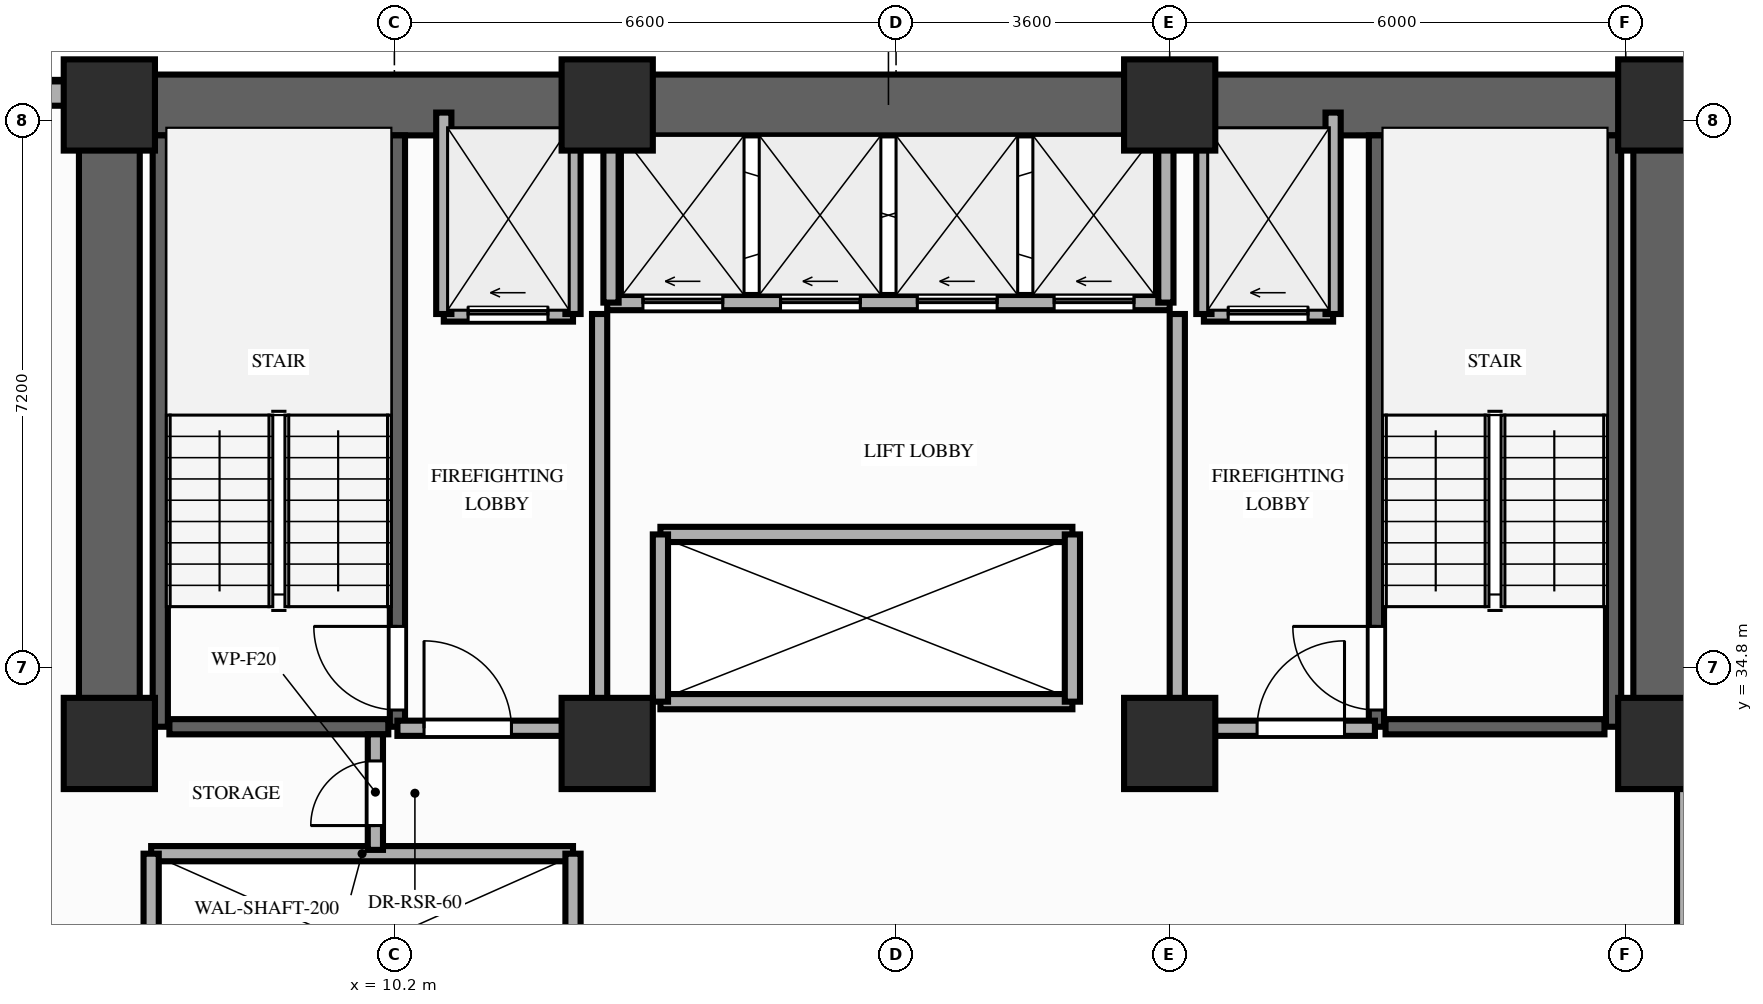
"""IFC4 building model, lengths in metres.
Left out: names, types, materials, properties, quantities, classifications, styles, units other than length and angle.
Written with IfcOpenShell. Run it as: python <this file> out.ifc"""

import sys

from ifc_helpers import new_model, si_unit, direction, frame, frame_2d, origin, origin_2d, place, context, subcontext, project, spatial, rectangle, extrude, element, fill, save


model = new_model("IFC4")
c1 = context("Model", 3, precision=1e-05, world=origin(), true_north=direction((0.0, 1.0)))
c2 = subcontext(c1, "Body", "Model", "MODEL_VIEW")
j1 = project(units=[si_unit("LENGTHUNIT", "METRE"), si_unit("PLANEANGLEUNIT", "RADIAN")], contexts=[c1])
p1 = place(None, origin())
s1 = spatial("IfcSite", under=j1, at=p1, CompositionType="ELEMENT")
p2 = place(p1, origin())
s2 = spatial("IfcBuilding", under=s1, at=p2, CompositionType="ELEMENT")
p3 = place(p2, frame((0.0, 0.0, 46.8)))
s3 = spatial("IfcBuildingStorey", under=s2, at=p3, CompositionType="ELEMENT", Elevation=46.8)
for number, where, z_axis, x_axis in (
    (1, (6.45, 33.8, 0.0), (0.0, 0.0, 1.0), (1.0, 0.0, 0.0)),
    (2, (13.0, 33.8, 0.0), (0.0, 0.0, 1.0), (1.0, 0.0, 0.0)),
    (3, (20.4, 33.8, 0.0), (0.0, 0.0, 1.0), (1.0, 0.0, 0.0)),
    (4, (26.9, 33.8, 0.0), (0.0, 0.0, 1.0), (1.0, 0.0, 0.0)),
    (5, (6.45, 42.2, 0.0), (0.0, 0.0, 1.0), (1.0, 0.0, 0.0)),
    (6, (13.0, 42.2, 0.0), (0.0, 0.0, 1.0), (1.0, 0.0, 0.0)),
    (7, (20.4, 42.2, 0.0), (0.0, 0.0, 1.0), (1.0, 0.0, 0.0)),
    (8, (26.9, 42.2, 0.0), (0.0, 0.0, 1.0), (1.0, 0.0, 0.0)),
):
    element("IfcColumn", number, at=place(p3, frame(where, z_axis=z_axis, x_axis=x_axis)), inside=s3, PredefinedType="COLUMN", context=c2, shape_type="SweptSolid", body=[
        extrude(rectangle(XDim=1.2, YDim=1.2, at=origin_2d()), origin(), (0.0, 0.0, 1.0), 3.2),
    ])
p4 = place(p3, frame((6.0, 42.35, 0.0), z_axis=(0.0, 0.0, 1.0), x_axis=(-1.0, 0.0, 0.0)))
e9 = element("IfcWall", 9, at=p4, inside=s3, PredefinedType="STANDARD", context=c2, shape_type="SweptSolid", body=[
    extrude(rectangle(XDim=2.0, YDim=0.32, at=frame_2d((1.0, 0.0))), origin(), (0.0, 0.0, 1.0), 3.02),
])
p5 = place(p3, frame((6.45, 42.2, 0.0), z_axis=(0.0, 0.0, 1.0), x_axis=(1.0, 0.0, 0.0)))
e10 = element("IfcWall", 10, at=p5, inside=s3, PredefinedType="SHEAR", context=c2, shape_type="SweptSolid", body=[
    extrude(rectangle(XDim=20.45, YDim=0.8, at=frame_2d((10.225, 0.0))), origin(), (0.0, 0.0, 1.0), 3.02),
])
for number, where, z_axis, x_axis in (
    (11, (6.45, 33.8, 0.0), (0.0, 0.0, 1.0), (0.0, 1.0, 0.0)),
    (12, (26.9, 33.8, 0.0), (0.0, 0.0, 1.0), (0.0, 1.0, 0.0)),
):
    element("IfcWall", number, at=place(p3, frame(where, z_axis=z_axis, x_axis=x_axis)), inside=s3, PredefinedType="SHEAR", context=c2, shape_type="SweptSolid", body=[
        extrude(rectangle(XDim=7.95, YDim=0.8, at=frame_2d((3.975, 0.0))), origin(), (0.0, 0.0, 1.0), 3.02),
    ])
p6 = place(p3, frame((7.12, 34.02, 0.0), z_axis=(0.0, 0.0, 1.0), x_axis=(0.0, 1.0, 0.0)))
e13 = element("IfcWall", 13, at=p6, inside=s3, PredefinedType="SHEAR", context=c2, shape_type="SweptSolid", body=[
    extrude(rectangle(XDim=7.78, YDim=0.2, at=frame_2d((3.89, 0.0))), origin(), (0.0, 0.0, 1.0), 3.02),
])
p7 = place(p3, frame((10.24, 34.02, 0.0), z_axis=(0.0, 0.0, 1.0), x_axis=(0.0, 1.0, 0.0)))
e14 = element("IfcWall", 14, at=p7, inside=s3, PredefinedType="SHEAR", context=c2, shape_type="SweptSolid", body=[
    extrude(rectangle(XDim=7.78, YDim=0.2, at=frame_2d((3.89, 0.0))), origin(), (0.0, 0.0, 1.0), 3.02),
])
p8 = place(p7, frame((0.22, 0.0, 0.0)))
e15 = element("IfcOpeningElement", 15, at=p8, cuts=e14, PredefinedType="OPENING", context=c2, shape_type="SweptSolid", body=[
    extrude(rectangle(XDim=1.1, YDim=2.15, at=frame_2d((0.55, 1.075))), frame((0.0, 0.11, 0.0), z_axis=(0.0, -1.0, 0.0), x_axis=(1.0, 0.0, 0.0)), (0.0, 0.0, 1.0), 0.22),
])
p9 = place(p3, frame((7.24, 34.02, 0.0), z_axis=(0.0, 0.0, 1.0), x_axis=(1.0, 0.0, 0.0)))
e16 = element("IfcWall", 16, at=p9, inside=s3, PredefinedType="SHEAR", context=c2, shape_type="SweptSolid", body=[
    extrude(rectangle(XDim=2.88, YDim=0.2, at=frame_2d((1.44, 0.0))), origin(), (0.0, 0.0, 1.0), 3.02),
])
p10 = place(p3, frame((23.12, 34.02, 0.0), z_axis=(0.0, 0.0, 1.0), x_axis=(0.0, 1.0, 0.0)))
e17 = element("IfcWall", 17, at=p10, inside=s3, PredefinedType="SHEAR", context=c2, shape_type="SweptSolid", body=[
    extrude(rectangle(XDim=7.78, YDim=0.2, at=frame_2d((3.89, 0.0))), origin(), (0.0, 0.0, 1.0), 3.02),
])
p11 = place(p10, frame((0.22, 0.0, 0.0)))
e18 = element("IfcOpeningElement", 18, at=p11, cuts=e17, PredefinedType="OPENING", context=c2, shape_type="SweptSolid", body=[
    extrude(rectangle(XDim=1.1, YDim=2.15, at=frame_2d((0.55, 1.075))), frame((0.0, 0.11, 0.0), z_axis=(0.0, -1.0, 0.0), x_axis=(1.0, 0.0, 0.0)), (0.0, 0.0, 1.0), 0.22),
])
p12 = place(p3, frame((26.24, 34.02, 0.0), z_axis=(0.0, 0.0, 1.0), x_axis=(0.0, 1.0, 0.0)))
e19 = element("IfcWall", 19, at=p12, inside=s3, PredefinedType="SHEAR", context=c2, shape_type="SweptSolid", body=[
    extrude(rectangle(XDim=7.78, YDim=0.2, at=frame_2d((3.89, 0.0))), origin(), (0.0, 0.0, 1.0), 3.02),
])
p13 = place(p3, frame((23.24, 34.02, 0.0), z_axis=(0.0, 0.0, 1.0), x_axis=(1.0, 0.0, 0.0)))
e20 = element("IfcWall", 20, at=p13, inside=s3, PredefinedType="SHEAR", context=c2, shape_type="SweptSolid", body=[
    extrude(rectangle(XDim=2.88, YDim=0.2, at=frame_2d((1.44, 0.0))), origin(), (0.0, 0.0, 1.0), 3.02),
])
p14 = place(p3, frame((7.0, 32.35, 0.0), z_axis=(0.0, 0.0, 1.0), x_axis=(1.0, 0.0, 0.0)))
e21 = element("IfcWall", 21, at=p14, inside=s3, PredefinedType="MOVABLE", context=c2, shape_type="SweptSolid", body=[
    extrude(rectangle(XDim=5.55, YDim=0.2, at=frame_2d((2.775, 0.0))), origin(), (0.0, 0.0, 1.0), 3.02),
])
for number, where, z_axis, x_axis in (
    (22, (7.0, 29.85, 0.0), (0.0, 0.0, 1.0), (0.0, 1.0, 0.0)),
    (23, (12.55, 29.85, 0.0), (0.0, 0.0, 1.0), (0.0, 1.0, 0.0)),
):
    element("IfcWall", number, at=place(p3, frame(where, z_axis=z_axis, x_axis=x_axis)), inside=s3, PredefinedType="MOVABLE", context=c2, shape_type="SweptSolid", body=[
        extrude(rectangle(XDim=2.5, YDim=0.2, at=frame_2d((1.25, 0.0))), origin(), (0.0, 0.0, 1.0), 3.02),
    ])
p15 = place(p3, frame((10.85, 39.45, 0.0), z_axis=(0.0, 0.0, 1.0), x_axis=(1.0, 0.0, 0.0)))
e24 = element("IfcWall", 24, at=p15, inside=s3, PredefinedType="MOVABLE", context=c2, shape_type="SweptSolid", body=[
    extrude(rectangle(XDim=1.7, YDim=0.2, at=frame_2d((0.85, 0.0))), origin(), (0.0, 0.0, 1.0), 3.02),
])
p16 = place(p15, frame((0.32, 0.0, 0.0)))
e25 = element("IfcOpeningElement", 25, at=p16, cuts=e24, PredefinedType="OPENING", context=c2, shape_type="SweptSolid", body=[
    extrude(rectangle(XDim=1.05, YDim=2.15, at=frame_2d((0.525, 1.075))), frame((0.0, 0.11, 0.0), z_axis=(0.0, -1.0, 0.0), x_axis=(1.0, 0.0, 0.0)), (0.0, 0.0, 1.0), 0.22),
])
p17 = place(p3, frame((20.85, 39.45, 0.0), z_axis=(0.0, 0.0, 1.0), x_axis=(1.0, 0.0, 0.0)))
e26 = element("IfcWall", 26, at=p17, inside=s3, PredefinedType="MOVABLE", context=c2, shape_type="SweptSolid", body=[
    extrude(rectangle(XDim=1.7, YDim=0.2, at=frame_2d((0.85, 0.0))), origin(), (0.0, 0.0, 1.0), 3.02),
])
p18 = place(p17, frame((0.32, 0.0, 0.0)))
e27 = element("IfcOpeningElement", 27, at=p18, cuts=e26, PredefinedType="OPENING", context=c2, shape_type="SweptSolid", body=[
    extrude(rectangle(XDim=1.05, YDim=2.15, at=frame_2d((0.525, 1.075))), frame((0.0, 0.11, 0.0), z_axis=(0.0, -1.0, 0.0), x_axis=(1.0, 0.0, 0.0)), (0.0, 0.0, 1.0), 0.22),
])
for number, where, z_axis, x_axis in (
    (28, (10.85, 39.45, 0.0), (0.0, 0.0, 1.0), (0.0, 1.0, 0.0)),
    (29, (12.55, 39.45, 0.0), (0.0, 0.0, 1.0), (0.0, 1.0, 0.0)),
):
    element("IfcWall", number, at=place(p3, frame(where, z_axis=z_axis, x_axis=x_axis)), inside=s3, PredefinedType="MOVABLE", context=c2, shape_type="SweptSolid", body=[
        extrude(rectangle(XDim=2.65, YDim=0.2, at=frame_2d((1.325, 0.0))), origin(), (0.0, 0.0, 1.0), 2.41),
    ])
p19 = place(p3, frame((12.9, 34.0, 0.0), z_axis=(0.0, 0.0, 1.0), x_axis=(0.0, 1.0, 0.0)))
e30 = element("IfcWall", 30, at=p19, inside=s3, PredefinedType="PARTITIONING", context=c2, shape_type="SweptSolid", body=[
    extrude(rectangle(XDim=5.45, YDim=0.2, at=frame_2d((2.725, 0.0))), origin(), (0.0, 0.0, 1.0), 2.41),
])
p20 = place(p3, frame((10.24, 34.0, 0.0), z_axis=(0.0, 0.0, 1.0), x_axis=(1.0, 0.0, 0.0)))
e31 = element("IfcWall", 31, at=p20, inside=s3, PredefinedType="PARTITIONING", context=c2, shape_type="SweptSolid", body=[
    extrude(rectangle(XDim=2.66, YDim=0.2, at=frame_2d((1.33, 0.0))), origin(), (0.0, 0.0, 1.0), 2.41),
])
p21 = place(p20, frame((0.35, 0.0, 0.0)))
e32 = element("IfcOpeningElement", 32, at=p21, cuts=e31, PredefinedType="OPENING", context=c2, shape_type="SweptSolid", body=[
    extrude(rectangle(XDim=1.15, YDim=2.15, at=frame_2d((0.575, 1.075))), frame((0.0, 0.11, 0.0), z_axis=(0.0, -1.0, 0.0), x_axis=(1.0, 0.0, 0.0)), (0.0, 0.0, 1.0), 0.22),
])
for number, where, z_axis, x_axis in (
    (33, (20.85, 39.45, 0.0), (0.0, 0.0, 1.0), (0.0, 1.0, 0.0)),
    (34, (22.55, 39.45, 0.0), (0.0, 0.0, 1.0), (0.0, 1.0, 0.0)),
):
    element("IfcWall", number, at=place(p3, frame(where, z_axis=z_axis, x_axis=x_axis)), inside=s3, PredefinedType="MOVABLE", context=c2, shape_type="SweptSolid", body=[
        extrude(rectangle(XDim=2.65, YDim=0.2, at=frame_2d((1.325, 0.0))), origin(), (0.0, 0.0, 1.0), 2.41),
    ])
p22 = place(p3, frame((20.5, 34.0, 0.0), z_axis=(0.0, 0.0, 1.0), x_axis=(0.0, 1.0, 0.0)))
e35 = element("IfcWall", 35, at=p22, inside=s3, PredefinedType="PARTITIONING", context=c2, shape_type="SweptSolid", body=[
    extrude(rectangle(XDim=5.45, YDim=0.2, at=frame_2d((2.725, 0.0))), origin(), (0.0, 0.0, 1.0), 2.41),
])
p23 = place(p3, frame((20.5, 34.0, 0.0), z_axis=(0.0, 0.0, 1.0), x_axis=(1.0, 0.0, 0.0)))
e36 = element("IfcWall", 36, at=p23, inside=s3, PredefinedType="PARTITIONING", context=c2, shape_type="SweptSolid", body=[
    extrude(rectangle(XDim=2.6, YDim=0.2, at=frame_2d((1.3, 0.0))), origin(), (0.0, 0.0, 1.0), 2.41),
])
p24 = place(p23, frame((1.05, 0.0, 0.0)))
e37 = element("IfcOpeningElement", 37, at=p24, cuts=e36, PredefinedType="OPENING", context=c2, shape_type="SweptSolid", body=[
    extrude(rectangle(XDim=1.15, YDim=2.15, at=frame_2d((0.575, 1.075))), frame((0.0, 0.11, 0.0), z_axis=(0.0, -1.0, 0.0), x_axis=(1.0, 0.0, 0.0)), (0.0, 0.0, 1.0), 0.22),
])
p25 = place(p3, frame((9.95, 32.4, 0.0), z_axis=(0.0, 0.0, 1.0), x_axis=(0.0, 1.0, 0.0)))
e38 = element("IfcWall", 38, at=p25, inside=s3, PredefinedType="PARTITIONING", context=c2, shape_type="SweptSolid", body=[
    extrude(rectangle(XDim=1.52, YDim=0.2, at=frame_2d((0.76, 0.0))), origin(), (0.0, 0.0, 1.0), 2.41),
])
p26 = place(p25, frame((0.32, 0.0, 0.0)))
e39 = element("IfcOpeningElement", 39, at=p26, cuts=e38, PredefinedType="OPENING", context=c2, shape_type="SweptSolid", body=[
    extrude(rectangle(XDim=0.85, YDim=2.05, at=frame_2d((0.425, 1.025))), frame((0.0, 0.11, 0.0), z_axis=(0.0, -1.0, 0.0), x_axis=(1.0, 0.0, 0.0)), (0.0, 0.0, 1.0), 0.22),
])
p27 = place(p3, frame((13.0, 39.6, 0.0), z_axis=(0.0, 0.0, 1.0), x_axis=(1.0, 0.0, 0.0)))
e40 = element("IfcWall", 40, at=p27, inside=s3, PredefinedType="MOVABLE", context=c2, shape_type="SweptSolid", body=[
    extrude(rectangle(XDim=7.4, YDim=0.2, at=frame_2d((3.7, 0.0))), origin(), (0.0, 0.0, 1.0), 3.02),
])
p28 = place(p27, frame((0.47, 0.0, 0.0)))
e41 = element("IfcOpeningElement", 41, at=p28, cuts=e40, PredefinedType="OPENING", context=c2, shape_type="SweptSolid", body=[
    extrude(rectangle(XDim=1.05, YDim=2.15, at=frame_2d((0.525, 1.075))), frame((0.0, 0.11, 0.0), z_axis=(0.0, -1.0, 0.0), x_axis=(1.0, 0.0, 0.0)), (0.0, 0.0, 1.0), 0.22),
])
p29 = place(p27, frame((2.28, 0.0, 0.0)))
e42 = element("IfcOpeningElement", 42, at=p29, cuts=e40, PredefinedType="OPENING", context=c2, shape_type="SweptSolid", body=[
    extrude(rectangle(XDim=1.05, YDim=2.15, at=frame_2d((0.525, 1.075))), frame((0.0, 0.11, 0.0), z_axis=(0.0, -1.0, 0.0), x_axis=(1.0, 0.0, 0.0)), (0.0, 0.0, 1.0), 0.22),
])
p30 = place(p27, frame((4.08, 0.0, 0.0)))
e43 = element("IfcOpeningElement", 43, at=p30, cuts=e40, PredefinedType="OPENING", context=c2, shape_type="SweptSolid", body=[
    extrude(rectangle(XDim=1.05, YDim=2.15, at=frame_2d((0.525, 1.075))), frame((0.0, 0.11, 0.0), z_axis=(0.0, -1.0, 0.0), x_axis=(1.0, 0.0, 0.0)), (0.0, 0.0, 1.0), 0.22),
])
p31 = place(p27, frame((5.88, 0.0, 0.0)))
e44 = element("IfcOpeningElement", 44, at=p31, cuts=e40, PredefinedType="OPENING", context=c2, shape_type="SweptSolid", body=[
    extrude(rectangle(XDim=1.05, YDim=2.15, at=frame_2d((0.525, 1.075))), frame((0.0, 0.11, 0.0), z_axis=(0.0, -1.0, 0.0), x_axis=(1.0, 0.0, 0.0)), (0.0, 0.0, 1.0), 0.22),
])
for number, where, z_axis, x_axis in (
    (45, (13.05, 39.6, 0.0), (0.0, 0.0, 1.0), (0.0, 1.0, 0.0)),
    (46, (20.35, 39.6, 0.0), (0.0, 0.0, 1.0), (0.0, 1.0, 0.0)),
):
    element("IfcWall", number, at=place(p3, frame(where, z_axis=z_axis, x_axis=x_axis)), inside=s3, PredefinedType="MOVABLE", context=c2, shape_type="SweptSolid", body=[
        extrude(rectangle(XDim=2.18, YDim=0.2, at=frame_2d((1.09, 0.0))), origin(), (0.0, 0.0, 1.0), 3.02),
    ])
for number, where, z_axis, x_axis in (
    (47, (13.7, 34.35, 0.0), (0.0, 0.0, 1.0), (1.0, 0.0, 0.0)),
    (48, (13.7, 36.55, 0.0), (0.0, 0.0, 1.0), (1.0, 0.0, 0.0)),
):
    element("IfcWall", number, at=place(p3, frame(where, z_axis=z_axis, x_axis=x_axis)), inside=s3, PredefinedType="MOVABLE", context=c2, shape_type="SweptSolid", body=[
        extrude(rectangle(XDim=5.42, YDim=0.2, at=frame_2d((2.71, 0.0))), origin(), (0.0, 0.0, 1.0), 3.02),
    ])
for number, where, z_axis, x_axis in (
    (49, (13.7, 34.35, 0.0), (0.0, 0.0, 1.0), (0.0, 1.0, 0.0)),
    (50, (19.12, 34.35, 0.0), (0.0, 0.0, 1.0), (0.0, 1.0, 0.0)),
):
    element("IfcWall", number, at=place(p3, frame(where, z_axis=z_axis, x_axis=x_axis)), inside=s3, PredefinedType="MOVABLE", context=c2, shape_type="SweptSolid", body=[
        extrude(rectangle(XDim=2.2, YDim=0.2, at=frame_2d((1.1, 0.0))), origin(), (0.0, 0.0, 1.0), 3.02),
    ])
p32 = place(p3, frame((27.15, 31.2, 0.0), z_axis=(0.0, 0.0, 1.0), x_axis=(0.0, 1.0, 0.0)))
e51 = element("IfcWall", 51, at=p32, inside=s3, PredefinedType="PARTITIONING", context=c2, shape_type="SweptSolid", body=[
    extrude(rectangle(XDim=2.48, YDim=0.15, at=frame_2d((1.24, 0.0))), origin(), (0.0, 0.0, 1.0), 2.41),
])
p33 = place(p8, origin())
e52 = element("IfcDoor", 52, at=p33, inside=s3, OperationType="SINGLE_SWING_RIGHT", PredefinedType="DOOR", context=c2, shape_type="SweptSolid", body=[
    extrude(rectangle(XDim=1.1, YDim=2.15, at=frame_2d((0.55, 1.075))), frame((0.0, 0.025, 0.0), z_axis=(0.0, -1.0, 0.0), x_axis=(1.0, 0.0, 0.0)), (0.0, 0.0, 1.0), 0.05),
])
fill(e15, e52)
p34 = place(p11, origin())
e53 = element("IfcDoor", 53, at=p34, inside=s3, OperationType="SINGLE_SWING_RIGHT", PredefinedType="DOOR", context=c2, shape_type="SweptSolid", body=[
    extrude(rectangle(XDim=1.1, YDim=2.15, at=frame_2d((0.55, 1.075))), frame((0.0, 0.025, 0.0), z_axis=(0.0, -1.0, 0.0), x_axis=(1.0, 0.0, 0.0)), (0.0, 0.0, 1.0), 0.05),
])
fill(e18, e53)
p35 = place(p16, origin())
e54 = element("IfcDoor", 54, at=p35, inside=s3, OperationType="SLIDING_TO_LEFT", PredefinedType="DOOR", context=c2, shape_type="SweptSolid", body=[
    extrude(rectangle(XDim=1.05, YDim=2.15, at=frame_2d((0.525, 1.075))), frame((0.0, 0.025, 0.0), z_axis=(0.0, -1.0, 0.0), x_axis=(1.0, 0.0, 0.0)), (0.0, 0.0, 1.0), 0.05),
])
fill(e25, e54)
p36 = place(p18, origin())
e55 = element("IfcDoor", 55, at=p36, inside=s3, OperationType="SLIDING_TO_LEFT", PredefinedType="DOOR", context=c2, shape_type="SweptSolid", body=[
    extrude(rectangle(XDim=1.05, YDim=2.15, at=frame_2d((0.525, 1.075))), frame((0.0, 0.025, 0.0), z_axis=(0.0, -1.0, 0.0), x_axis=(1.0, 0.0, 0.0)), (0.0, 0.0, 1.0), 0.05),
])
fill(e27, e55)
p37 = place(p21, origin())
e56 = element("IfcDoor", 56, at=p37, inside=s3, OperationType="SINGLE_SWING_LEFT", PredefinedType="DOOR", context=c2, shape_type="SweptSolid", body=[
    extrude(rectangle(XDim=1.15, YDim=2.15, at=frame_2d((0.575, 1.075))), frame((0.0, 0.025, 0.0), z_axis=(0.0, -1.0, 0.0), x_axis=(1.0, 0.0, 0.0)), (0.0, 0.0, 1.0), 0.05),
])
fill(e32, e56)
p38 = place(p24, origin())
e57 = element("IfcDoor", 57, at=p38, inside=s3, OperationType="SINGLE_SWING_RIGHT", PredefinedType="DOOR", context=c2, shape_type="SweptSolid", body=[
    extrude(rectangle(XDim=1.15, YDim=2.15, at=frame_2d((0.575, 1.075))), frame((0.0, 0.025, 0.0), z_axis=(0.0, -1.0, 0.0), x_axis=(1.0, 0.0, 0.0)), (0.0, 0.0, 1.0), 0.05),
])
fill(e37, e57)
p39 = place(p26, origin())
e58 = element("IfcDoor", 58, at=p39, inside=s3, OperationType="SINGLE_SWING_LEFT", PredefinedType="DOOR", context=c2, shape_type="SweptSolid", body=[
    extrude(rectangle(XDim=0.85, YDim=2.05, at=frame_2d((0.425, 1.025))), frame((0.0, 0.025, 0.0), z_axis=(0.0, -1.0, 0.0), x_axis=(1.0, 0.0, 0.0)), (0.0, 0.0, 1.0), 0.05),
])
fill(e39, e58)
p40 = place(p28, origin())
e59 = element("IfcDoor", 59, at=p40, inside=s3, OperationType="SLIDING_TO_LEFT", PredefinedType="DOOR", context=c2, shape_type="SweptSolid", body=[
    extrude(rectangle(XDim=1.05, YDim=2.15, at=frame_2d((0.525, 1.075))), frame((0.0, 0.025, 0.0), z_axis=(0.0, -1.0, 0.0), x_axis=(1.0, 0.0, 0.0)), (0.0, 0.0, 1.0), 0.05),
])
fill(e41, e59)
p41 = place(p29, origin())
e60 = element("IfcDoor", 60, at=p41, inside=s3, OperationType="SLIDING_TO_LEFT", PredefinedType="DOOR", context=c2, shape_type="SweptSolid", body=[
    extrude(rectangle(XDim=1.05, YDim=2.15, at=frame_2d((0.525, 1.075))), frame((0.0, 0.025, 0.0), z_axis=(0.0, -1.0, 0.0), x_axis=(1.0, 0.0, 0.0)), (0.0, 0.0, 1.0), 0.05),
])
fill(e42, e60)
p42 = place(p30, origin())
e61 = element("IfcDoor", 61, at=p42, inside=s3, OperationType="SLIDING_TO_LEFT", PredefinedType="DOOR", context=c2, shape_type="SweptSolid", body=[
    extrude(rectangle(XDim=1.05, YDim=2.15, at=frame_2d((0.525, 1.075))), frame((0.0, 0.025, 0.0), z_axis=(0.0, -1.0, 0.0), x_axis=(1.0, 0.0, 0.0)), (0.0, 0.0, 1.0), 0.05),
])
fill(e43, e61)
p43 = place(p31, origin())
e62 = element("IfcDoor", 62, at=p43, inside=s3, OperationType="SLIDING_TO_LEFT", PredefinedType="DOOR", context=c2, shape_type="SweptSolid", body=[
    extrude(rectangle(XDim=1.05, YDim=2.15, at=frame_2d((0.525, 1.075))), frame((0.0, 0.025, 0.0), z_axis=(0.0, -1.0, 0.0), x_axis=(1.0, 0.0, 0.0)), (0.0, 0.0, 1.0), 0.05),
])
fill(e44, e62)
save(model, sys.argv[1])
